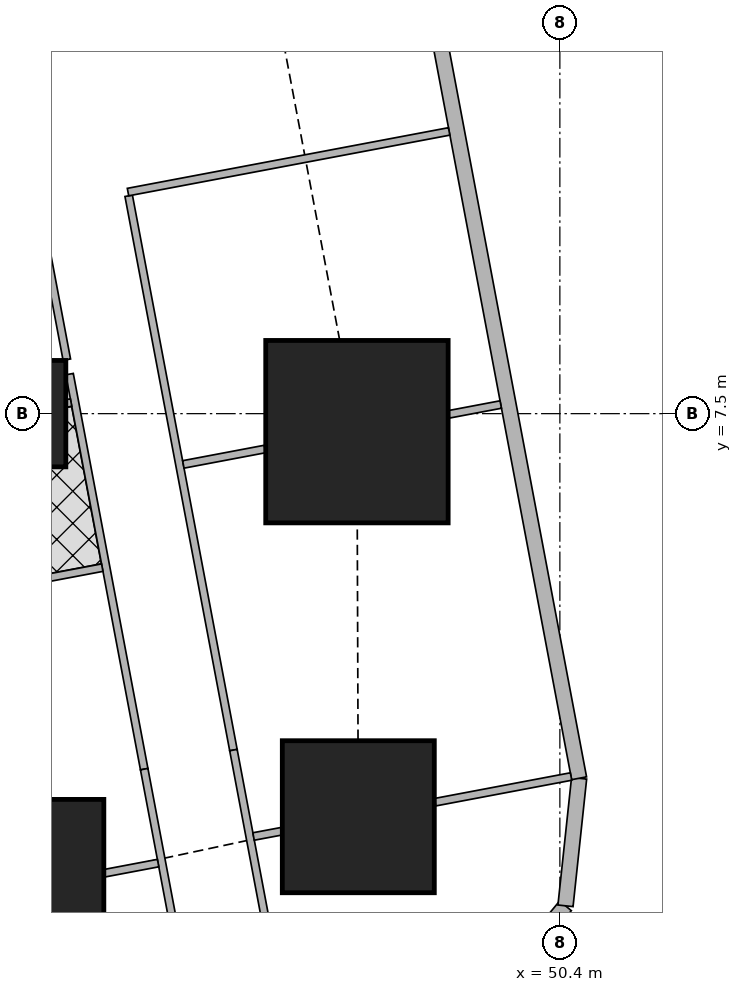
"""IFC4 building model, lengths in metres.
Left out: names, types, materials, properties, quantities, classifications, styles, units other than length and angle.
Written with IfcOpenShell. Run it as: python <this file> out.ifc"""

import sys

from ifc_helpers import new_model, si_unit, direction, frame, frame_2d, origin, origin_2d, place, context, subcontext, project, spatial, rectangle, extrude, element, fill, save


model = new_model("IFC4")
c1 = context("Model", 3, precision=1e-05, world=origin(), true_north=direction((0.0, 1.0)))
c2 = subcontext(c1, "Body", "Model", "MODEL_VIEW")
j1 = project(units=[si_unit("LENGTHUNIT", "METRE"), si_unit("PLANEANGLEUNIT", "RADIAN")], contexts=[c1])
p1 = place(None, origin())
s1 = spatial("IfcSite", under=j1, at=p1, CompositionType="ELEMENT")
p2 = place(p1, origin())
s2 = spatial("IfcBuilding", under=s1, at=p2, CompositionType="ELEMENT")
p3 = place(p2, frame((0.0, 0.0, 234.95)))
s3 = spatial("IfcBuildingStorey", under=s2, at=p3, CompositionType="ELEMENT", Elevation=234.95)
p4 = place(p3, frame((43.2, 1.225, 0.0), z_axis=(0.0, 0.0, 1.0), x_axis=(1.0, 0.0, 0.0)))
e1 = element("IfcColumn", 1, at=p4, inside=s3, PredefinedType="COLUMN", context=c2, shape_type="SweptSolid", body=[
    extrude(rectangle(XDim=2.4, YDim=2.4, at=origin_2d()), origin(), (0.0, 0.0, 1.0), 3.75),
])
p5 = place(p3, frame((47.748, 2.197, 0.0), z_axis=(0.0, 0.0, 1.0), x_axis=(1.0, 0.0, 0.0)))
e2 = element("IfcColumn", 2, at=p5, inside=s3, PredefinedType="COLUMN", context=c2, shape_type="SweptSolid", body=[
    extrude(rectangle(XDim=2.0, YDim=2.0, at=origin_2d()), origin(), (0.0, 0.0, 1.0), 3.75),
])
p6 = place(p3, frame((43.2, 7.5, 0.0), z_axis=(0.0, 0.0, 1.0), x_axis=(1.0, 0.0, 0.0)))
e3 = element("IfcColumn", 3, at=p6, inside=s3, PredefinedType="COLUMN", context=c2, shape_type="SweptSolid", body=[
    extrude(rectangle(XDim=1.4, YDim=1.4, at=origin_2d()), origin(), (0.0, 0.0, 1.0), 3.75),
])
p7 = place(p3, frame((47.73, 7.263, 0.0), z_axis=(0.0, 0.0, 1.0), x_axis=(1.0, 0.0, 0.0)))
e4 = element("IfcColumn", 4, at=p7, inside=s3, PredefinedType="COLUMN", context=c2, shape_type="SweptSolid", body=[
    extrude(rectangle(XDim=2.4, YDim=2.4, at=origin_2d()), origin(), (0.0, 0.0, 1.0), 3.75),
])
p8 = place(p3, frame((49.407, -0.263, 0.0), z_axis=(0.0, 0.0, 1.0), x_axis=(0.638042593423, 0.770001070764, 0.0)))
e5 = element("IfcWall", 5, at=p8, inside=s3, PredefinedType="SOLIDWALL", context=c2, shape_type="SweptSolid", body=[
    extrude(rectangle(XDim=1.673, YDim=0.2, at=frame_2d((0.836, 0.0))), origin(), (0.0, 0.0, 1.0), 3.5),
])
p9 = place(p3, frame((50.474, 1.025, 0.0), z_axis=(0.0, 0.0, 1.0), x_axis=(0.106047815515, 0.994361031429, 0.0)))
e6 = element("IfcWall", 6, at=p9, inside=s3, PredefinedType="SOLIDWALL", context=c2, shape_type="SweptSolid", body=[
    extrude(rectangle(XDim=1.688, YDim=0.2, at=frame_2d((0.844, 0.0))), origin(), (0.0, 0.0, 1.0), 3.5),
])
p10 = place(p3, frame((50.653, 2.703, 0.0), z_axis=(0.0, 0.0, 1.0), x_axis=(-0.185612026696, 0.982623109613, 0.0)))
e7 = element("IfcWall", 7, at=p10, inside=s3, PredefinedType="SOLIDWALL", context=c2, shape_type="SweptSolid", body=[
    extrude(rectangle(XDim=41.393, YDim=0.2, at=frame_2d((20.697, 0.0))), origin(), (0.0, 0.0, 1.0), 3.5),
])
p11 = place(p10, frame((1.633, 0.0, 0.9)))
e8 = element("IfcOpeningElement", 8, at=p11, cuts=e7, PredefinedType="OPENING", context=c2, shape_type="SweptSolid", body=[
    extrude(rectangle(XDim=1.8, YDim=1.5, at=frame_2d((0.9, 0.75))), frame((0.0, 0.11, 0.0), z_axis=(0.0, -1.0, 0.0), x_axis=(1.0, 0.0, 0.0)), (0.0, 0.0, 1.0), 0.22),
])
p12 = place(p10, frame((6.032, 0.0, 0.9)))
e9 = element("IfcOpeningElement", 9, at=p12, cuts=e7, PredefinedType="OPENING", context=c2, shape_type="SweptSolid", body=[
    extrude(rectangle(XDim=1.8, YDim=1.5, at=frame_2d((0.9, 0.75))), frame((0.0, 0.11, 0.0), z_axis=(0.0, -1.0, 0.0), x_axis=(1.0, 0.0, 0.0)), (0.0, 0.0, 1.0), 0.22),
])
p13 = place(p10, frame((9.848, 0.0, 0.9)))
e10 = element("IfcOpeningElement", 10, at=p13, cuts=e7, PredefinedType="OPENING", context=c2, shape_type="SweptSolid", body=[
    extrude(rectangle(XDim=1.8, YDim=1.5, at=frame_2d((0.9, 0.75))), frame((0.0, 0.11, 0.0), z_axis=(0.0, -1.0, 0.0), x_axis=(1.0, 0.0, 0.0)), (0.0, 0.0, 1.0), 0.22),
])
p14 = place(p10, frame((13.664, 0.0, 0.9)))
e11 = element("IfcOpeningElement", 11, at=p14, cuts=e7, PredefinedType="OPENING", context=c2, shape_type="SweptSolid", body=[
    extrude(rectangle(XDim=1.8, YDim=1.5, at=frame_2d((0.9, 0.75))), frame((0.0, 0.11, 0.0), z_axis=(0.0, -1.0, 0.0), x_axis=(1.0, 0.0, 0.0)), (0.0, 0.0, 1.0), 0.22),
])
p15 = place(p10, frame((17.481, 0.0, 0.9)))
e12 = element("IfcOpeningElement", 12, at=p15, cuts=e7, PredefinedType="OPENING", context=c2, shape_type="SweptSolid", body=[
    extrude(rectangle(XDim=1.8, YDim=1.5, at=frame_2d((0.9, 0.75))), frame((0.0, 0.11, 0.0), z_axis=(0.0, -1.0, 0.0), x_axis=(1.0, 0.0, 0.0)), (0.0, 0.0, 1.0), 0.22),
])
p16 = place(p10, frame((21.297, 0.0, 0.9)))
e13 = element("IfcOpeningElement", 13, at=p16, cuts=e7, PredefinedType="OPENING", context=c2, shape_type="SweptSolid", body=[
    extrude(rectangle(XDim=1.8, YDim=1.5, at=frame_2d((0.9, 0.75))), frame((0.0, 0.11, 0.0), z_axis=(0.0, -1.0, 0.0), x_axis=(1.0, 0.0, 0.0)), (0.0, 0.0, 1.0), 0.22),
])
p17 = place(p10, frame((25.113, 0.0, 0.9)))
e14 = element("IfcOpeningElement", 14, at=p17, cuts=e7, PredefinedType="OPENING", context=c2, shape_type="SweptSolid", body=[
    extrude(rectangle(XDim=1.8, YDim=1.5, at=frame_2d((0.9, 0.75))), frame((0.0, 0.11, 0.0), z_axis=(0.0, -1.0, 0.0), x_axis=(1.0, 0.0, 0.0)), (0.0, 0.0, 1.0), 0.22),
])
p18 = place(p10, frame((28.93, 0.0, 0.9)))
e15 = element("IfcOpeningElement", 15, at=p18, cuts=e7, PredefinedType="OPENING", context=c2, shape_type="SweptSolid", body=[
    extrude(rectangle(XDim=1.8, YDim=1.5, at=frame_2d((0.9, 0.75))), frame((0.0, 0.11, 0.0), z_axis=(0.0, -1.0, 0.0), x_axis=(1.0, 0.0, 0.0)), (0.0, 0.0, 1.0), 0.22),
])
p19 = place(p10, frame((32.746, 0.0, 0.9)))
e16 = element("IfcOpeningElement", 16, at=p19, cuts=e7, PredefinedType="OPENING", context=c2, shape_type="SweptSolid", body=[
    extrude(rectangle(XDim=1.8, YDim=1.5, at=frame_2d((0.9, 0.75))), frame((0.0, 0.11, 0.0), z_axis=(0.0, -1.0, 0.0), x_axis=(1.0, 0.0, 0.0)), (0.0, 0.0, 1.0), 0.22),
])
p20 = place(p10, frame((36.481, 0.0, 0.9)))
e17 = element("IfcOpeningElement", 17, at=p20, cuts=e7, PredefinedType="OPENING", context=c2, shape_type="SweptSolid", body=[
    extrude(rectangle(XDim=1.8, YDim=1.5, at=frame_2d((0.9, 0.75))), frame((0.0, 0.11, 0.0), z_axis=(0.0, -1.0, 0.0), x_axis=(1.0, 0.0, 0.0)), (0.0, 0.0, 1.0), 0.22),
])
p21 = place(p3, frame((44.727, 10.366, 0.0), z_axis=(0.0, 0.0, 1.0), x_axis=(0.185678775129, -0.982610498858, 0.0)))
e18 = element("IfcWall", 18, at=p21, inside=s3, PredefinedType="PARTITIONING", context=c2, shape_type="SweptSolid", body=[
    extrude(rectangle(XDim=7.421, YDim=0.1, at=frame_2d((3.71, 0.0))), origin(), (0.0, 0.0, 1.0), 3.5),
])
p22 = place(p21, frame((0.151, 0.0, 0.0)))
e19 = element("IfcOpeningElement", 19, at=p22, cuts=e18, PredefinedType="OPENING", context=c2, shape_type="SweptSolid", body=[
    extrude(rectangle(XDim=0.9, YDim=2.1, at=frame_2d((0.45, 1.05))), frame((0.0, 0.06, 0.0), z_axis=(0.0, -1.0, 0.0), x_axis=(1.0, 0.0, 0.0)), (0.0, 0.0, 1.0), 0.12),
])
p23 = place(p21, frame((4.65, 0.0, 0.0)))
e20 = element("IfcOpeningElement", 20, at=p23, cuts=e18, PredefinedType="OPENING", context=c2, shape_type="SweptSolid", body=[
    extrude(rectangle(XDim=0.9, YDim=2.1, at=frame_2d((0.45, 1.05))), frame((0.0, 0.06, 0.0), z_axis=(0.0, -1.0, 0.0), x_axis=(1.0, 0.0, 0.0)), (0.0, 0.0, 1.0), 0.12),
])
p24 = place(p3, frame((46.105, 3.074, 0.0), z_axis=(0.0, 0.0, 1.0), x_axis=(0.185631845838, -0.982619365681, 0.0)))
e21 = element("IfcWall", 21, at=p24, inside=s3, PredefinedType="PARTITIONING", context=c2, shape_type="SweptSolid", body=[
    extrude(rectangle(XDim=2.403, YDim=0.1, at=frame_2d((1.201, 0.0))), origin(), (0.0, 0.0, 1.0), 2.05),
])
p25 = place(p3, frame((43.539, 10.192, 0.0), z_axis=(0.0, 0.0, 1.0), x_axis=(0.185443145218, -0.982654995353, 0.0)))
e22 = element("IfcWall", 22, at=p25, inside=s3, PredefinedType="PARTITIONING", context=c2, shape_type="SweptSolid", body=[
    extrude(rectangle(XDim=2.017, YDim=0.1, at=frame_2d((1.008, 0.0))), origin(), (0.0, 0.0, 1.0), 3.5),
])
p26 = place(p3, frame((43.949, 8.02, 0.0), z_axis=(0.0, 0.0, 1.0), x_axis=(0.185656792073, -0.982614652627, 0.0)))
e23 = element("IfcWall", 23, at=p26, inside=s3, PredefinedType="PARTITIONING", context=c2, shape_type="SweptSolid", body=[
    extrude(rectangle(XDim=5.289, YDim=0.1, at=frame_2d((2.645, 0.0))), origin(), (0.0, 0.0, 1.0), 3.5),
])
p27 = place(p26, frame((1.2, 0.0, 0.0)))
e24 = element("IfcOpeningElement", 24, at=p27, cuts=e23, PredefinedType="OPENING", context=c2, shape_type="SweptSolid", body=[
    extrude(rectangle(XDim=0.9, YDim=2.1, at=frame_2d((0.45, 1.05))), frame((0.0, 0.06, 0.0), z_axis=(0.0, -1.0, 0.0), x_axis=(1.0, 0.0, 0.0)), (0.0, 0.0, 1.0), 0.12),
])
p28 = place(p26, frame((2.935, 0.0, 0.0)))
e25 = element("IfcOpeningElement", 25, at=p28, cuts=e23, PredefinedType="OPENING", context=c2, shape_type="SweptSolid", body=[
    extrude(rectangle(XDim=0.9, YDim=2.1, at=frame_2d((0.45, 1.05))), frame((0.0, 0.06, 0.0), z_axis=(0.0, -1.0, 0.0), x_axis=(1.0, 0.0, 0.0)), (0.0, 0.0, 1.0), 0.12),
])
p29 = place(p3, frame((44.931, 2.823, 0.0), z_axis=(0.0, 0.0, 1.0), x_axis=(0.185631845838, -0.982619365681, 0.0)))
e26 = element("IfcWall", 26, at=p29, inside=s3, PredefinedType="PARTITIONING", context=c2, shape_type="SweptSolid", body=[
    extrude(rectangle(XDim=2.403, YDim=0.1, at=frame_2d((1.201, 0.0))), origin(), (0.0, 0.0, 1.0), 2.05),
])
p30 = place(p3, frame((48.943, 11.213, 0.0), z_axis=(0.0, 0.0, 1.0), x_axis=(-0.982633535512, -0.185556823879, 0.0)))
e27 = element("IfcWall", 27, at=p30, inside=s3, PredefinedType="PARTITIONING", context=c2, shape_type="SweptSolid", body=[
    extrude(rectangle(XDim=4.3, YDim=0.1, at=frame_2d((2.15, 0.0))), origin(), (0.0, 0.0, 1.0), 2.05),
])
p31 = place(p3, frame((49.622, 7.62, 0.0), z_axis=(0.0, 0.0, 1.0), x_axis=(-0.98254419619, -0.186029305578, 0.0)))
e28 = element("IfcWall", 28, at=p31, inside=s3, PredefinedType="PARTITIONING", context=c2, shape_type="SweptSolid", body=[
    extrude(rectangle(XDim=0.694, YDim=0.1, at=frame_2d((0.347, 0.0))), origin(), (0.0, 0.0, 1.0), 3.5),
])
p32 = place(p3, frame((46.52, 7.035, 0.0), z_axis=(0.0, 0.0, 1.0), x_axis=(-0.982620932907, -0.185623549726, 0.0)))
e29 = element("IfcWall", 29, at=p32, inside=s3, PredefinedType="PARTITIONING", context=c2, shape_type="SweptSolid", body=[
    extrude(rectangle(XDim=1.093, YDim=0.1, at=frame_2d((0.546, 0.0))), origin(), (0.0, 0.0, 1.0), 3.5),
])
p33 = place(p3, frame((50.547, 2.726, 0.0), z_axis=(0.0, 0.0, 1.0), x_axis=(-0.982603988143, -0.185713226471, 0.0)))
e30 = element("IfcWall", 30, at=p33, inside=s3, PredefinedType="PARTITIONING", context=c2, shape_type="SweptSolid", body=[
    extrude(rectangle(XDim=1.821, YDim=0.1, at=frame_2d((0.91, 0.0))), origin(), (0.0, 0.0, 1.0), 2.05),
])
p34 = place(p3, frame((46.738, 2.006, 0.0), z_axis=(0.0, 0.0, 1.0), x_axis=(-0.982820466874, -0.184564161994, 0.0)))
e31 = element("IfcWall", 31, at=p34, inside=s3, PredefinedType="PARTITIONING", context=c2, shape_type="SweptSolid", body=[
    extrude(rectangle(XDim=0.374, YDim=0.1, at=frame_2d((0.187, 0.0))), origin(), (0.0, 0.0, 1.0), 2.05),
])
p35 = place(p3, frame((43.969, 7.646, 0.0), z_axis=(0.0, 0.0, 1.0), x_axis=(-0.983147034646, -0.182816597351, 0.0)))
e32 = element("IfcWall", 32, at=p35, inside=s3, PredefinedType="PARTITIONING", context=c2, shape_type="SweptSolid", body=[
    extrude(rectangle(XDim=0.06, YDim=0.1, at=frame_2d((0.03, 0.0))), origin(), (0.0, 0.0, 1.0), 3.5),
])
p36 = place(p3, frame((45.114, 1.587, 0.0), z_axis=(0.0, 0.0, 1.0), x_axis=(-0.982671022916, -0.185358195723, 0.0)))
e33 = element("IfcWall", 33, at=p36, inside=s3, PredefinedType="PARTITIONING", context=c2, shape_type="SweptSolid", body=[
    extrude(rectangle(XDim=0.717, YDim=0.1, at=frame_2d((0.358, 0.0))), origin(), (0.0, 0.0, 1.0), 2.05),
])
p37 = place(p3, frame((44.379, 5.474, 0.0), z_axis=(0.0, 0.0, 1.0), x_axis=(-0.982607026909, -0.185697147715, 0.0)))
e34 = element("IfcWall", 34, at=p37, inside=s3, PredefinedType="PARTITIONING", context=c2, shape_type="SweptSolid", body=[
    extrude(rectangle(XDim=3.275, YDim=0.1, at=frame_2d((1.637, 0.0))), origin(), (0.0, 0.0, 1.0), 3.5),
])
p38 = place(p11, origin())
e35 = element("IfcWindow", 35, at=p38, inside=s3, PartitioningType="SINGLE_PANEL", PredefinedType="WINDOW", context=c2, shape_type="SweptSolid", body=[
    extrude(rectangle(XDim=1.8, YDim=1.5, at=frame_2d((0.9, 0.75))), frame((0.0, 0.03, 0.0), z_axis=(0.0, -1.0, 0.0), x_axis=(1.0, 0.0, 0.0)), (0.0, 0.0, 1.0), 0.06),
])
fill(e8, e35)
p39 = place(p12, origin())
e36 = element("IfcWindow", 36, at=p39, inside=s3, PartitioningType="SINGLE_PANEL", PredefinedType="WINDOW", context=c2, shape_type="SweptSolid", body=[
    extrude(rectangle(XDim=1.8, YDim=1.5, at=frame_2d((0.9, 0.75))), frame((0.0, 0.03, 0.0), z_axis=(0.0, -1.0, 0.0), x_axis=(1.0, 0.0, 0.0)), (0.0, 0.0, 1.0), 0.06),
])
fill(e9, e36)
p40 = place(p22, origin())
e37 = element("IfcDoor", 37, at=p40, inside=s3, OperationType="SINGLE_SWING_LEFT", PredefinedType="DOOR", context=c2, shape_type="SweptSolid", body=[
    extrude(rectangle(XDim=0.9, YDim=2.1, at=frame_2d((0.45, 1.05))), frame((0.0, 0.025, 0.0), z_axis=(0.0, -1.0, 0.0), x_axis=(1.0, 0.0, 0.0)), (0.0, 0.0, 1.0), 0.05),
])
fill(e19, e37)
p41 = place(p23, origin())
e38 = element("IfcDoor", 38, at=p41, inside=s3, OperationType="SINGLE_SWING_LEFT", PredefinedType="DOOR", context=c2, shape_type="SweptSolid", body=[
    extrude(rectangle(XDim=0.9, YDim=2.1, at=frame_2d((0.45, 1.05))), frame((0.0, 0.025, 0.0), z_axis=(0.0, -1.0, 0.0), x_axis=(1.0, 0.0, 0.0)), (0.0, 0.0, 1.0), 0.05),
])
fill(e20, e38)
p42 = place(p27, origin())
e39 = element("IfcDoor", 39, at=p42, inside=s3, OperationType="SINGLE_SWING_LEFT", PredefinedType="DOOR", context=c2, shape_type="SweptSolid", body=[
    extrude(rectangle(XDim=0.9, YDim=2.1, at=frame_2d((0.45, 1.05))), frame((0.0, 0.025, 0.0), z_axis=(0.0, -1.0, 0.0), x_axis=(1.0, 0.0, 0.0)), (0.0, 0.0, 1.0), 0.05),
])
fill(e24, e39)
p43 = place(p28, origin())
e40 = element("IfcDoor", 40, at=p43, inside=s3, OperationType="SINGLE_SWING_RIGHT", PredefinedType="DOOR", context=c2, shape_type="SweptSolid", body=[
    extrude(rectangle(XDim=0.9, YDim=2.1, at=frame_2d((0.45, 1.05))), frame((0.0, 0.025, 0.0), z_axis=(0.0, -1.0, 0.0), x_axis=(1.0, 0.0, 0.0)), (0.0, 0.0, 1.0), 0.05),
])
fill(e25, e40)
save(model, sys.argv[1])
